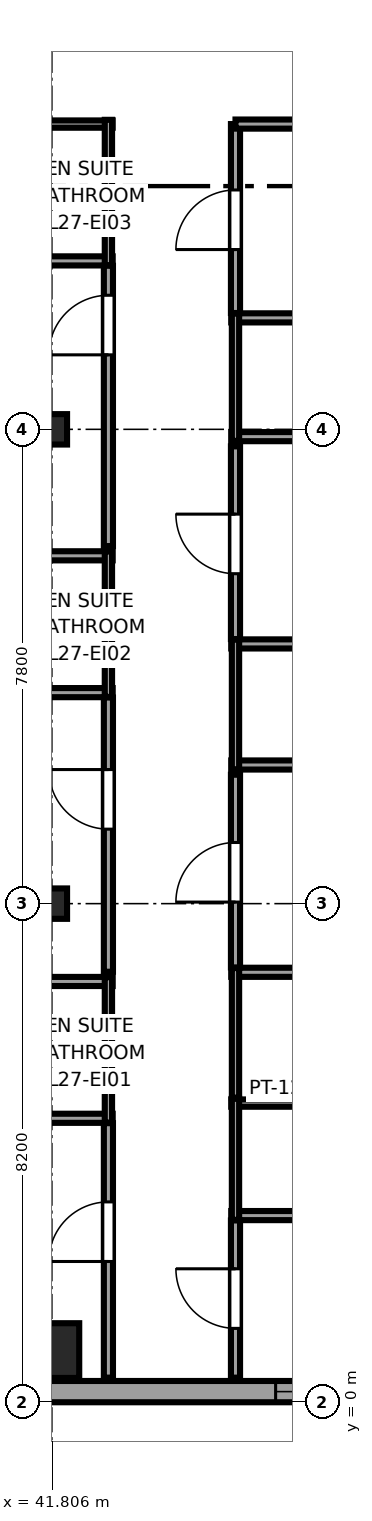
"""IFC4 building model, lengths in metres.
Left out: names, types, materials, properties, quantities, classifications, styles, units other than length and angle.
Written with IfcOpenShell. Run it as: python <this file> out.ifc"""

import sys

from ifc_helpers import new_model, si_unit, direction, frame, frame_2d, origin, origin_2d, place, context, subcontext, project, spatial, rectangle, i_section, extrude, source, transform, mapped, element, fill, save


model = new_model("IFC4")
c1 = context("Model", 3, precision=1e-05, world=origin(), true_north=direction((0.0, 1.0)))
c2 = subcontext(c1, "Body", "Model", "MODEL_VIEW")
j1 = project(units=[si_unit("LENGTHUNIT", "METRE"), si_unit("PLANEANGLEUNIT", "RADIAN")], contexts=[c1])
p1 = place(None, origin())
s1 = spatial("IfcSite", under=j1, at=p1, CompositionType="ELEMENT")
p2 = place(p1, origin())
s2 = spatial("IfcBuilding", under=s1, at=p2, CompositionType="ELEMENT")
p3 = place(p2, frame((0.0, 0.0, 108.0)))
s3 = spatial("IfcBuildingStorey", under=s2, at=p3, CompositionType="ELEMENT", Elevation=108.0)
m1 = source(origin(), c2, "Body", "SweptSolid", [
    extrude(rectangle(XDim=0.9, YDim=0.9, at=origin_2d()), origin(), (0.0, 0.0, 1.0), 3.55),
])
p4 = place(p3, frame((41.8, 0.85, 0.0), z_axis=(0.0, 0.0, 1.0), x_axis=(1.0, 0.0, 0.0)))
e1 = element("IfcColumn", 1, at=p4, inside=s3, PredefinedType="COLUMN", context=c2, shape_type="MappedRepresentation", body=[
    mapped(m1, transform((0.0, 0.0, 0.0), x_axis=(1.0, 0.0, 0.0), y_axis=(0.0, 1.0, 0.0), z_axis=(0.0, 0.0, 1.0), scale=1.0)),
])
m2 = source(origin(), c2, "Body", "SweptSolid", [
    extrude(i_section(OverallWidth=0.5, OverallDepth=0.5, WebThickness=0.022, FlangeThickness=0.034, at=origin_2d()), origin(), (0.0, 0.0, 1.0), 3.55),
])
for number, where, z_axis, x_axis in (
    (2, (41.8, 8.2, 0.0), (0.0, 0.0, 1.0), (1.0, 0.0, 0.0)),
    (3, (41.8, 16.0, 0.0), (0.0, 0.0, 1.0), (1.0, 0.0, 0.0)),
):
    element("IfcColumn", number, at=place(p3, frame(where, z_axis=z_axis, x_axis=x_axis)), inside=s3, PredefinedType="COLUMN", context=c2, shape_type="MappedRepresentation", body=[
        mapped(m2, transform((0.0, 0.0, 0.0), x_axis=(1.0, 0.0, 0.0), y_axis=(0.0, 1.0, 0.0), z_axis=(0.0, 0.0, 1.0), scale=1.0)),
    ])
p5 = place(p3, frame((34.375, 0.175, 0.0), z_axis=(0.0, 0.0, 1.0), x_axis=(1.0, 0.0, 0.0)))
e4 = element("IfcWall", 4, at=p5, inside=s3, PredefinedType="SOLIDWALL", context=c2, shape_type="SweptSolid", body=[
    extrude(rectangle(XDim=18.008, YDim=0.35, at=frame_2d((9.004, 0.0))), origin(), (0.0, 0.0, 1.0), 3.37),
])
p6 = place(p5, frame((1.651, 0.0, 0.68)))
e5 = element("IfcOpeningElement", 5, at=p6, cuts=e4, PredefinedType="OPENING", context=c2, shape_type="SweptSolid", body=[
    extrude(rectangle(XDim=2.1, YDim=1.9, at=frame_2d((1.05, 0.95))), frame((0.0, 0.185, 0.0), z_axis=(0.0, -1.0, 0.0), x_axis=(1.0, 0.0, 0.0)), (0.0, 0.0, 1.0), 0.37),
])
p7 = place(p5, frame((11.105, 0.0, 0.68)))
e6 = element("IfcOpeningElement", 6, at=p7, cuts=e4, PredefinedType="OPENING", context=c2, shape_type="SweptSolid", body=[
    extrude(rectangle(XDim=2.1, YDim=1.9, at=frame_2d((1.05, 0.95))), frame((0.0, 0.185, 0.0), z_axis=(0.0, -1.0, 0.0), x_axis=(1.0, 0.0, 0.0)), (0.0, 0.0, 1.0), 0.37),
])
for number, where, z_axis, x_axis in (
    (7, (40.21, 4.67, 0.0), (0.0, 0.0, 1.0), (1.0, 0.0, 0.0)),
    (8, (40.21, 6.92, 0.0), (0.0, 0.0, 1.0), (1.0, 0.0, 0.0)),
):
    element("IfcWall", number, at=place(p3, frame(where, z_axis=z_axis, x_axis=x_axis)), inside=s3, PredefinedType="PARTITIONING", context=c2, shape_type="SweptSolid", body=[
        extrude(rectangle(XDim=2.59, YDim=0.15, at=frame_2d((1.295, 0.0))), origin(), (0.0, 0.0, 1.0), 3.37),
    ])
p8 = place(p3, frame((42.73, 4.6, 0.0), z_axis=(0.0, 0.0, 1.0), x_axis=(0.0, 1.0, 0.0)))
e9 = element("IfcWall", 9, at=p8, inside=s3, PredefinedType="PLUMBINGWALL", context=c2, shape_type="SweptSolid", body=[
    extrude(rectangle(XDim=2.39, YDim=0.12, at=frame_2d((1.195, 0.0))), origin(), (0.0, 0.0, 1.0), 3.37),
])
for number, where, z_axis, x_axis in (
    (10, (40.21, 11.67, 0.0), (0.0, 0.0, 1.0), (1.0, 0.0, 0.0)),
    (11, (40.21, 13.92, 0.0), (0.0, 0.0, 1.0), (1.0, 0.0, 0.0)),
):
    element("IfcWall", number, at=place(p3, frame(where, z_axis=z_axis, x_axis=x_axis)), inside=s3, PredefinedType="PARTITIONING", context=c2, shape_type="SweptSolid", body=[
        extrude(rectangle(XDim=2.59, YDim=0.15, at=frame_2d((1.295, 0.0))), origin(), (0.0, 0.0, 1.0), 3.37),
    ])
p9 = place(p3, frame((42.73, 11.6, 0.0), z_axis=(0.0, 0.0, 1.0), x_axis=(0.0, 1.0, 0.0)))
e12 = element("IfcWall", 12, at=p9, inside=s3, PredefinedType="PLUMBINGWALL", context=c2, shape_type="SweptSolid", body=[
    extrude(rectangle(XDim=2.39, YDim=0.12, at=frame_2d((1.195, 0.0))), origin(), (0.0, 0.0, 1.0), 3.37),
])
p10 = place(p3, frame((40.21, 18.77, 0.0), z_axis=(0.0, 0.0, 1.0), x_axis=(1.0, 0.0, 0.0)))
e13 = element("IfcWall", 13, at=p10, inside=s3, PredefinedType="PARTITIONING", context=c2, shape_type="SweptSolid", body=[
    extrude(rectangle(XDim=2.59, YDim=0.15, at=frame_2d((1.295, 0.0))), origin(), (0.0, 0.0, 1.0), 3.37),
])
p11 = place(p3, frame((40.21, 21.02, 0.0), z_axis=(0.0, 0.0, 1.0), x_axis=(1.0, 0.0, 0.0)))
e14 = element("IfcWall", 14, at=p11, inside=s3, PredefinedType="PLUMBINGWALL", context=c2, shape_type="SweptSolid", body=[
    extrude(rectangle(XDim=2.59, YDim=0.12, at=frame_2d((1.295, 0.0))), origin(), (0.0, 0.0, 1.0), 3.37),
])
p12 = place(p3, frame((42.73, 18.7, 0.0), z_axis=(0.0, 0.0, 1.0), x_axis=(0.0, 1.0, 0.0)))
e15 = element("IfcWall", 15, at=p12, inside=s3, PredefinedType="PLUMBINGWALL", context=c2, shape_type="SweptSolid", body=[
    extrude(rectangle(XDim=2.39, YDim=0.12, at=frame_2d((1.195, 0.0))), origin(), (0.0, 0.0, 1.0), 3.37),
])
p13 = place(p3, frame((44.75, 3.07, 0.0), z_axis=(0.0, 0.0, 1.0), x_axis=(1.0, 0.0, 0.0)))
e16 = element("IfcWall", 16, at=p13, inside=s3, PredefinedType="PARTITIONING", context=c2, shape_type="SweptSolid", body=[
    extrude(rectangle(XDim=2.59, YDim=0.15, at=frame_2d((1.295, 0.0))), origin(), (0.0, 0.0, 1.0), 3.37),
])
p14 = place(p3, frame((44.75, 4.92, 0.0), z_axis=(0.0, 0.0, 1.0), x_axis=(1.0, 0.0, 0.0)))
e17 = element("IfcWall", 17, at=p14, inside=s3, PredefinedType="PLUMBINGWALL", context=c2, shape_type="SweptSolid", body=[
    extrude(rectangle(XDim=2.59, YDim=0.12, at=frame_2d((1.295, 0.0))), origin(), (0.0, 0.0, 1.0), 3.37),
])
p15 = place(p3, frame((44.82, 3.0, 0.0), z_axis=(0.0, 0.0, 1.0), x_axis=(0.0, 1.0, 0.0)))
e18 = element("IfcWall", 18, at=p15, inside=s3, PredefinedType="PLUMBINGWALL", context=c2, shape_type="SweptSolid", body=[
    extrude(rectangle(XDim=1.99, YDim=0.12, at=frame_2d((0.995, 0.0))), origin(), (0.0, 0.0, 1.0), 3.37),
])
p16 = place(p3, frame((44.75, 7.071, 0.0), z_axis=(0.0, 0.0, 1.0), x_axis=(1.0, 0.0, 0.0)))
e19 = element("IfcWall", 19, at=p16, inside=s3, PredefinedType="PARTITIONING", context=c2, shape_type="SweptSolid", body=[
    extrude(rectangle(XDim=2.59, YDim=0.15, at=frame_2d((1.295, 0.0))), origin(), (0.0, 0.0, 1.0), 3.37),
])
p17 = place(p3, frame((44.82, 5.01, 0.0), z_axis=(0.0, 0.0, 1.0), x_axis=(0.0, 1.0, 0.0)))
e20 = element("IfcWall", 20, at=p17, inside=s3, PredefinedType="PLUMBINGWALL", context=c2, shape_type="SweptSolid", body=[
    extrude(rectangle(XDim=2.131, YDim=0.12, at=frame_2d((1.065, 0.0))), origin(), (0.0, 0.0, 1.0), 3.37),
])
p18 = place(p3, frame((44.75, 10.48, 0.0), z_axis=(0.0, 0.0, 1.0), x_axis=(1.0, 0.0, 0.0)))
e21 = element("IfcWall", 21, at=p18, inside=s3, PredefinedType="PARTITIONING", context=c2, shape_type="SweptSolid", body=[
    extrude(rectangle(XDim=11.845, YDim=0.15, at=frame_2d((5.922, 0.0))), origin(), (0.0, 0.0, 1.0), 3.37),
])
p19 = place(p3, frame((44.75, 12.471, 0.0), z_axis=(0.0, 0.0, 1.0), x_axis=(1.0, 0.0, 0.0)))
e22 = element("IfcWall", 22, at=p19, inside=s3, PredefinedType="PARTITIONING", context=c2, shape_type="SweptSolid", body=[
    extrude(rectangle(XDim=2.59, YDim=0.15, at=frame_2d((1.295, 0.0))), origin(), (0.0, 0.0, 1.0), 3.37),
])
p20 = place(p3, frame((44.82, 10.41, 0.0), z_axis=(0.0, 0.0, 1.0), x_axis=(0.0, 1.0, 0.0)))
e23 = element("IfcWall", 23, at=p20, inside=s3, PredefinedType="PLUMBINGWALL", context=c2, shape_type="SweptSolid", body=[
    extrude(rectangle(XDim=2.131, YDim=0.12, at=frame_2d((1.065, 0.0))), origin(), (0.0, 0.0, 1.0), 3.37),
])
p21 = place(p3, frame((44.75, 15.88, 0.0), z_axis=(0.0, 0.0, 1.0), x_axis=(1.0, 0.0, 0.0)))
e24 = element("IfcWall", 24, at=p21, inside=s3, PredefinedType="PARTITIONING", context=c2, shape_type="SweptSolid", body=[
    extrude(rectangle(XDim=11.845, YDim=0.15, at=frame_2d((5.922, 0.0))), origin(), (0.0, 0.0, 1.0), 2.748),
])
p22 = place(p3, frame((44.75, 17.833, 0.0), z_axis=(0.0, 0.0, 1.0), x_axis=(1.0, 0.0, 0.0)))
e25 = element("IfcWall", 25, at=p22, inside=s3, PredefinedType="PARTITIONING", context=c2, shape_type="SweptSolid", body=[
    extrude(rectangle(XDim=2.59, YDim=0.15, at=frame_2d((1.295, 0.0))), origin(), (0.0, 0.0, 1.0), 3.37),
])
p23 = place(p3, frame((44.82, 15.81, 0.0), z_axis=(0.0, 0.0, 1.0), x_axis=(0.0, 1.0, 0.0)))
e26 = element("IfcWall", 26, at=p23, inside=s3, PredefinedType="PLUMBINGWALL", context=c2, shape_type="SweptSolid", body=[
    extrude(rectangle(XDim=2.093, YDim=0.12, at=frame_2d((1.046, 0.0))), origin(), (0.0, 0.0, 1.0), 3.37),
])
p24 = place(p3, frame((42.73, 0.405, 0.0), z_axis=(0.0, 0.0, 1.0), x_axis=(0.0, 1.0, 0.0)))
e27 = element("IfcWall", 27, at=p24, inside=s3, PredefinedType="PARTITIONING", context=c2, shape_type="SweptSolid", body=[
    extrude(rectangle(XDim=4.185, YDim=0.15, at=frame_2d((2.093, 0.0))), origin(), (0.0, 0.0, 1.0), 3.37),
])
p25 = place(p24, frame((1.91, 0.0, 0.0)))
e28 = element("IfcOpeningElement", 28, at=p25, cuts=e27, PredefinedType="OPENING", context=c2, shape_type="SweptSolid", body=[
    extrude(rectangle(XDim=0.98, YDim=2.12, at=frame_2d((0.49, 1.06))), frame((0.0, 0.085, 0.0), z_axis=(0.0, -1.0, 0.0), x_axis=(1.0, 0.0, 0.0)), (0.0, 0.0, 1.0), 0.17),
])
p26 = place(p3, frame((42.73, 7.08, 0.0), z_axis=(0.0, 0.0, 1.0), x_axis=(0.0, 1.0, 0.0)))
e29 = element("IfcWall", 29, at=p26, inside=s3, PredefinedType="PARTITIONING", context=c2, shape_type="SweptSolid", body=[
    extrude(rectangle(XDim=4.51, YDim=0.15, at=frame_2d((2.255, 0.0))), origin(), (0.0, 0.0, 1.0), 3.37),
])
p27 = place(p26, frame((2.345, 0.0, 0.0)))
e30 = element("IfcOpeningElement", 30, at=p27, cuts=e29, PredefinedType="OPENING", context=c2, shape_type="SweptSolid", body=[
    extrude(rectangle(XDim=0.98, YDim=2.12, at=frame_2d((0.49, 1.06))), frame((0.0, 0.085, 0.0), z_axis=(0.0, -1.0, 0.0), x_axis=(1.0, 0.0, 0.0)), (0.0, 0.0, 1.0), 0.17),
])
p28 = place(p3, frame((42.73, 14.08, 0.0), z_axis=(0.0, 0.0, 1.0), x_axis=(0.0, 1.0, 0.0)))
e31 = element("IfcWall", 31, at=p28, inside=s3, PredefinedType="PARTITIONING", context=c2, shape_type="SweptSolid", body=[
    extrude(rectangle(XDim=4.61, YDim=0.15, at=frame_2d((2.305, 0.0))), origin(), (0.0, 0.0, 1.0), 3.37),
])
p29 = place(p28, frame((3.145, 0.0, 0.0)))
e32 = element("IfcOpeningElement", 32, at=p29, cuts=e31, PredefinedType="OPENING", context=c2, shape_type="SweptSolid", body=[
    extrude(rectangle(XDim=0.98, YDim=2.12, at=frame_2d((0.49, 1.06))), frame((0.0, 0.085, 0.0), z_axis=(0.0, -1.0, 0.0), x_axis=(1.0, 0.0, 0.0)), (0.0, 0.0, 1.0), 0.17),
])
p30 = place(p3, frame((44.82, 0.405, 0.0), z_axis=(0.0, 0.0, 1.0), x_axis=(0.0, 1.0, 0.0)))
e33 = element("IfcWall", 33, at=p30, inside=s3, PredefinedType="PARTITIONING", context=c2, shape_type="SweptSolid", body=[
    extrude(rectangle(XDim=2.585, YDim=0.15, at=frame_2d((1.292, 0.0))), origin(), (0.0, 0.0, 1.0), 3.37),
])
p31 = place(p30, frame((0.81, 0.0, 0.0)))
e34 = element("IfcOpeningElement", 34, at=p31, cuts=e33, PredefinedType="OPENING", context=c2, shape_type="SweptSolid", body=[
    extrude(rectangle(XDim=0.98, YDim=2.12, at=frame_2d((0.49, 1.06))), frame((0.0, 0.085, 0.0), z_axis=(0.0, -1.0, 0.0), x_axis=(1.0, 0.0, 0.0)), (0.0, 0.0, 1.0), 0.17),
])
p32 = place(p3, frame((44.82, 7.151, 0.0), z_axis=(0.0, 0.0, 1.0), x_axis=(0.0, 1.0, 0.0)))
e35 = element("IfcWall", 35, at=p32, inside=s3, PredefinedType="PARTITIONING", context=c2, shape_type="SweptSolid", body=[
    extrude(rectangle(XDim=3.169, YDim=0.15, at=frame_2d((1.584, 0.0))), origin(), (0.0, 0.0, 1.0), 3.37),
])
p33 = place(p32, frame((1.074, 0.0, 0.0)))
e36 = element("IfcOpeningElement", 36, at=p33, cuts=e35, PredefinedType="OPENING", context=c2, shape_type="SweptSolid", body=[
    extrude(rectangle(XDim=0.98, YDim=2.12, at=frame_2d((0.49, 1.06))), frame((0.0, 0.085, 0.0), z_axis=(0.0, -1.0, 0.0), x_axis=(1.0, 0.0, 0.0)), (0.0, 0.0, 1.0), 0.17),
])
p34 = place(p3, frame((44.82, 12.551, 0.0), z_axis=(0.0, 0.0, 1.0), x_axis=(0.0, 1.0, 0.0)))
e37 = element("IfcWall", 37, at=p34, inside=s3, PredefinedType="PARTITIONING", context=c2, shape_type="SweptSolid", body=[
    extrude(rectangle(XDim=3.169, YDim=0.15, at=frame_2d((1.584, 0.0))), origin(), (0.0, 0.0, 1.0), 3.37),
])
p35 = place(p34, frame((1.074, 0.0, 0.0)))
e38 = element("IfcOpeningElement", 38, at=p35, cuts=e37, PredefinedType="OPENING", context=c2, shape_type="SweptSolid", body=[
    extrude(rectangle(XDim=0.98, YDim=2.12, at=frame_2d((0.49, 1.06))), frame((0.0, 0.085, 0.0), z_axis=(0.0, -1.0, 0.0), x_axis=(1.0, 0.0, 0.0)), (0.0, 0.0, 1.0), 0.17),
])
p36 = place(p3, frame((44.82, 17.913, 0.0), z_axis=(0.0, 0.0, 1.0), x_axis=(0.0, 1.0, 0.0)))
e39 = element("IfcWall", 39, at=p36, inside=s3, PredefinedType="PARTITIONING", context=c2, shape_type="SweptSolid", body=[
    extrude(rectangle(XDim=3.107, YDim=0.15, at=frame_2d((1.553, 0.0))), origin(), (0.0, 0.0, 1.0), 3.37),
])
p37 = place(p36, frame((1.043, 0.0, 0.0)))
e40 = element("IfcOpeningElement", 40, at=p37, cuts=e39, PredefinedType="OPENING", context=c2, shape_type="SweptSolid", body=[
    extrude(rectangle(XDim=0.98, YDim=2.12, at=frame_2d((0.49, 1.06))), frame((0.0, 0.085, 0.0), z_axis=(0.0, -1.0, 0.0), x_axis=(1.0, 0.0, 0.0)), (0.0, 0.0, 1.0), 0.17),
])
p38 = place(p3, frame((44.82, 21.02, 0.0), z_axis=(0.0, 0.0, 1.0), x_axis=(1.0, 0.0, 0.0)))
e41 = element("IfcWall", 41, at=p38, inside=s3, PredefinedType="PARTITIONING", context=c2, shape_type="SweptSolid", body=[
    extrude(rectangle(XDim=11.775, YDim=0.15, at=frame_2d((5.887, 0.0))), origin(), (0.0, 0.0, 1.0), 3.37),
])
m3 = source(origin(), c2, "Body", "SweptSolid", [
    extrude(rectangle(XDim=2.1, YDim=1.9, at=frame_2d((1.05, 0.95))), frame((0.0, 0.09, 0.0), z_axis=(0.0, -1.0, 0.0), x_axis=(1.0, 0.0, 0.0)), (0.0, 0.0, 1.0), 0.06),
])
p39 = place(p7, origin())
e42 = element("IfcWindow", 42, at=p39, inside=s3, PartitioningType="TRIPLE_PANEL_HORIZONTAL", PredefinedType="WINDOW", context=c2, shape_type="MappedRepresentation", body=[
    mapped(m3, transform((0.0, 0.0, 0.0), x_axis=(1.0, 0.0, 0.0), y_axis=(0.0, 1.0, 0.0), z_axis=(0.0, 0.0, 1.0), scale=1.0)),
])
fill(e6, e42)
m4 = source(origin(), c2, "Body", "SweptSolid", [
    extrude(rectangle(XDim=0.98, YDim=2.12, at=frame_2d((0.49, 1.06))), frame((0.0, 0.025, 0.0), z_axis=(0.0, -1.0, 0.0), x_axis=(1.0, 0.0, 0.0)), (0.0, 0.0, 1.0), 0.05),
])
p40 = place(p25, origin())
e43 = element("IfcDoor", 43, at=p40, inside=s3, OperationType="SINGLE_SWING_LEFT", PredefinedType="DOOR", context=c2, shape_type="MappedRepresentation", body=[
    mapped(m4, transform((0.0, 0.0, 0.0), x_axis=(1.0, 0.0, 0.0), y_axis=(0.0, 1.0, 0.0), z_axis=(0.0, 0.0, 1.0), scale=1.0)),
])
fill(e28, e43)
p41 = place(p27, origin())
e44 = element("IfcDoor", 44, at=p41, inside=s3, OperationType="SINGLE_SWING_RIGHT", PredefinedType="DOOR", context=c2, shape_type="MappedRepresentation", body=[
    mapped(m4, transform((0.0, 0.0, 0.0), x_axis=(1.0, 0.0, 0.0), y_axis=(0.0, 1.0, 0.0), z_axis=(0.0, 0.0, 1.0), scale=1.0)),
])
fill(e30, e44)
p42 = place(p29, origin())
e45 = element("IfcDoor", 45, at=p42, inside=s3, OperationType="SINGLE_SWING_LEFT", PredefinedType="DOOR", context=c2, shape_type="MappedRepresentation", body=[
    mapped(m4, transform((0.0, 0.0, 0.0), x_axis=(1.0, 0.0, 0.0), y_axis=(0.0, 1.0, 0.0), z_axis=(0.0, 0.0, 1.0), scale=1.0)),
])
fill(e32, e45)
p43 = place(p31, origin())
e46 = element("IfcDoor", 46, at=p43, inside=s3, OperationType="SINGLE_SWING_RIGHT", PredefinedType="DOOR", context=c2, shape_type="MappedRepresentation", body=[
    mapped(m4, transform((0.0, 0.0, 0.0), x_axis=(1.0, 0.0, 0.0), y_axis=(0.0, 1.0, 0.0), z_axis=(0.0, 0.0, 1.0), scale=1.0)),
])
fill(e34, e46)
p44 = place(p33, origin())
e47 = element("IfcDoor", 47, at=p44, inside=s3, OperationType="SINGLE_SWING_LEFT", PredefinedType="DOOR", context=c2, shape_type="MappedRepresentation", body=[
    mapped(m4, transform((0.0, 0.0, 0.0), x_axis=(1.0, 0.0, 0.0), y_axis=(0.0, 1.0, 0.0), z_axis=(0.0, 0.0, 1.0), scale=1.0)),
])
fill(e36, e47)
p45 = place(p35, origin())
e48 = element("IfcDoor", 48, at=p45, inside=s3, OperationType="SINGLE_SWING_RIGHT", PredefinedType="DOOR", context=c2, shape_type="MappedRepresentation", body=[
    mapped(m4, transform((0.0, 0.0, 0.0), x_axis=(1.0, 0.0, 0.0), y_axis=(0.0, 1.0, 0.0), z_axis=(0.0, 0.0, 1.0), scale=1.0)),
])
fill(e38, e48)
p46 = place(p37, origin())
e49 = element("IfcDoor", 49, at=p46, inside=s3, OperationType="SINGLE_SWING_LEFT", PredefinedType="DOOR", context=c2, shape_type="MappedRepresentation", body=[
    mapped(m4, transform((0.0, 0.0, 0.0), x_axis=(1.0, 0.0, 0.0), y_axis=(0.0, 1.0, 0.0), z_axis=(0.0, 0.0, 1.0), scale=1.0)),
])
fill(e40, e49)
save(model, sys.argv[1])
